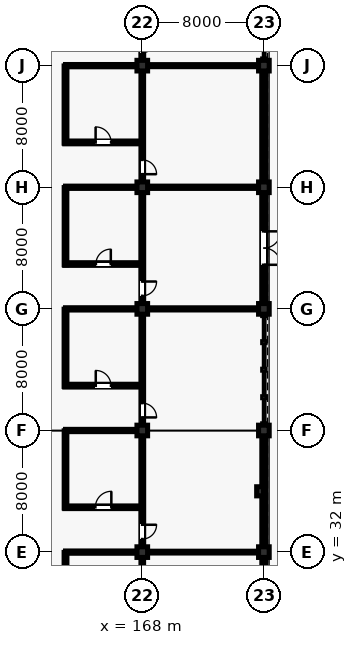
"""IFC4 building model, lengths in metres.
Left out: names, types, materials, properties, quantities, classifications, styles, units other than length and angle.
Written with IfcOpenShell. Run it as: python <this file> out.ifc"""

import sys

from ifc_helpers import new_model, si_unit, direction, frame, frame_2d, origin, origin_2d, place, context, subcontext, project, spatial, rectangle, extrude, element, fill, save


model = new_model("IFC4")
c1 = context("Model", 3, precision=1e-05, world=origin(), true_north=direction((0.0, 1.0)))
c2 = subcontext(c1, "Body", "Model", "MODEL_VIEW")
j1 = project(units=[si_unit("LENGTHUNIT", "METRE"), si_unit("PLANEANGLEUNIT", "RADIAN")], contexts=[c1])
p1 = place(None, origin())
s1 = spatial("IfcSite", under=j1, at=p1, CompositionType="ELEMENT")
p2 = place(p1, origin())
s2 = spatial("IfcBuilding", under=s1, at=p2, CompositionType="ELEMENT")
p3 = place(p2, origin())
s3 = spatial("IfcBuildingStorey", under=s2, at=p3, CompositionType="ELEMENT", Elevation=0.0)
for number, where, z_axis, x_axis in (
    (1, (168.0, 32.0, 0.0), (0.0, 0.0, 1.0), (1.0, 0.0, 0.0)),
    (2, (168.0, 40.0, 0.0), (0.0, 0.0, 1.0), (1.0, 0.0, 0.0)),
    (3, (168.0, 48.0, 0.0), (0.0, 0.0, 1.0), (1.0, 0.0, 0.0)),
    (4, (168.0, 56.0, 0.0), (0.0, 0.0, 1.0), (1.0, 0.0, 0.0)),
    (5, (168.0, 64.0, 0.0), (0.0, 0.0, 1.0), (1.0, 0.0, 0.0)),
    (6, (176.0, 32.0, 0.0), (0.0, 0.0, 1.0), (1.0, 0.0, 0.0)),
    (7, (176.0, 40.0, 0.0), (0.0, 0.0, 1.0), (1.0, 0.0, 0.0)),
    (8, (176.0, 48.0, 0.0), (0.0, 0.0, 1.0), (1.0, 0.0, 0.0)),
    (9, (176.0, 56.0, 0.0), (0.0, 0.0, 1.0), (1.0, 0.0, 0.0)),
    (10, (176.0, 64.0, 0.0), (0.0, 0.0, 1.0), (1.0, 0.0, 0.0)),
):
    element("IfcColumn", number, at=place(p3, frame(where, z_axis=z_axis, x_axis=x_axis)), inside=s3, PredefinedType="COLUMN", context=c2, shape_type="SweptSolid", body=[
        extrude(rectangle(XDim=0.7, YDim=0.7, at=origin_2d()), origin(), (0.0, 0.0, 1.0), 5.28),
    ])
p4 = place(p3, frame((175.75, 36.0, 0.0), z_axis=(0.0, 0.0, 1.0), x_axis=(1.0, 0.0, 0.0)))
e11 = element("IfcColumn", 11, at=p4, inside=s3, PredefinedType="PILASTER", context=c2, shape_type="SweptSolid", body=[
    extrude(rectangle(XDim=0.45, YDim=0.6, at=origin_2d()), origin(), (0.0, 0.0, 1.0), 5.28),
])
p5 = place(p3, frame((176.0, 24.385, 0.0), z_axis=(0.0, 0.0, 1.0), x_axis=(0.0, 1.0, 0.0)))
e12 = element("IfcWall", 12, at=p5, inside=s3, PredefinedType="SOLIDWALL", context=c2, shape_type="SweptSolid", body=[
    extrude(rectangle(XDim=7.28, YDim=0.27, at=frame_2d((3.64, 0.0))), origin(), (0.0, 0.0, 1.0), 4.674),
])
p6 = place(p5, frame((2.54, 0.0, 0.0)))
e13 = element("IfcOpeningElement", 13, at=p6, cuts=e12, PredefinedType="OPENING", context=c2, shape_type="SweptSolid", body=[
    extrude(rectangle(XDim=2.2, YDim=2.5, at=frame_2d((1.1, 1.25))), frame((0.0, 0.145, 0.0), z_axis=(0.0, -1.0, 0.0), x_axis=(1.0, 0.0, 0.0)), (0.0, 0.0, 1.0), 0.29),
])
p7 = place(p3, frame((176.0, 32.335, 0.0), z_axis=(0.0, 0.0, 1.0), x_axis=(0.0, 1.0, 0.0)))
e14 = element("IfcWall", 14, at=p7, inside=s3, PredefinedType="SOLIDWALL", context=c2, shape_type="SweptSolid", body=[
    extrude(rectangle(XDim=7.33, YDim=0.27, at=frame_2d((3.665, 0.0))), origin(), (0.0, 0.0, 1.0), 4.614),
])
p8 = place(p7, frame((4.25, 0.0, 0.9)))
e15 = element("IfcOpeningElement", 15, at=p8, cuts=e14, PredefinedType="OPENING", context=c2, shape_type="SweptSolid", body=[
    extrude(rectangle(XDim=2.15, YDim=2.8, at=frame_2d((1.075, 1.4))), frame((0.0, 0.145, 0.0), z_axis=(0.0, -1.0, 0.0), x_axis=(1.0, 0.0, 0.0)), (0.0, 0.0, 1.0), 0.29),
])
p9 = place(p3, frame((176.0, 48.335, 0.0), z_axis=(0.0, 0.0, 1.0), x_axis=(0.0, 1.0, 0.0)))
e16 = element("IfcWall", 16, at=p9, inside=s3, PredefinedType="SOLIDWALL", context=c2, shape_type="SweptSolid", body=[
    extrude(rectangle(XDim=7.33, YDim=0.28, at=frame_2d((3.665, 0.0))), origin(), (0.0, 0.0, 1.0), 4.61),
])
p10 = place(p9, frame((2.565, 0.0, 0.0)))
e17 = element("IfcOpeningElement", 17, at=p10, cuts=e16, PredefinedType="OPENING", context=c2, shape_type="SweptSolid", body=[
    extrude(rectangle(XDim=2.2, YDim=2.5, at=frame_2d((1.1, 1.25))), frame((0.0, 0.15, 0.0), z_axis=(0.0, -1.0, 0.0), x_axis=(1.0, 0.0, 0.0)), (0.0, 0.0, 1.0), 0.3),
])
p11 = place(p3, frame((176.0, 56.335, 0.0), z_axis=(0.0, 0.0, 1.0), x_axis=(0.0, 1.0, 0.0)))
e18 = element("IfcWall", 18, at=p11, inside=s3, PredefinedType="SOLIDWALL", context=c2, shape_type="SweptSolid", body=[
    extrude(rectangle(XDim=7.33, YDim=0.28, at=frame_2d((3.665, 0.0))), origin(), (0.0, 0.0, 1.0), 4.674),
])
p12 = place(p11, frame((2.465, 0.0, 0.9)))
e19 = element("IfcOpeningElement", 19, at=p12, cuts=e18, PredefinedType="OPENING", context=c2, shape_type="SweptSolid", body=[
    extrude(rectangle(XDim=2.4, YDim=2.8, at=frame_2d((1.2, 1.4))), frame((0.0, 0.15, 0.0), z_axis=(0.0, -1.0, 0.0), x_axis=(1.0, 0.0, 0.0)), (0.0, 0.0, 1.0), 0.3),
])
p13 = place(p3, frame((162.95, 26.9, 0.0), z_axis=(0.0, 0.0, 1.0), x_axis=(0.0, 1.0, 0.0)))
e20 = element("IfcWall", 20, at=p13, inside=s3, PredefinedType="PARTITIONING", context=c2, shape_type="SweptSolid", body=[
    extrude(rectangle(XDim=5.08, YDim=0.185, at=frame_2d((2.54, 0.0))), origin(), (0.0, 0.0, 1.0), 4.327),
])
p14 = place(p3, frame((162.95, 32.0, 0.0), z_axis=(0.0, 0.0, 1.0), x_axis=(1.0, 0.0, 0.0)))
e21 = element("IfcWall", 21, at=p14, inside=s3, PredefinedType="PARTITIONING", context=c2, shape_type="SweptSolid", body=[
    extrude(rectangle(XDim=4.69, YDim=0.15, at=frame_2d((2.345, 0.0))), origin(), (0.0, 0.0, 1.0), 4.327),
])
p15 = place(p3, frame((162.9, 34.95, 0.0), z_axis=(0.0, 0.0, 1.0), x_axis=(1.0, 0.0, 0.0)))
e22 = element("IfcWall", 22, at=p15, inside=s3, PredefinedType="PARTITIONING", context=c2, shape_type="SweptSolid", body=[
    extrude(rectangle(XDim=5.08, YDim=0.175, at=frame_2d((2.54, 0.0))), origin(), (0.0, 0.0, 1.0), 4.412),
])
p16 = place(p15, frame((2.015, 0.0, 0.0)))
e23 = element("IfcOpeningElement", 23, at=p16, cuts=e22, PredefinedType="OPENING", context=c2, shape_type="SweptSolid", body=[
    extrude(rectangle(XDim=1.05, YDim=2.15, at=frame_2d((0.525, 1.075))), frame((0.0, 0.097, 0.0), z_axis=(0.0, -1.0, 0.0), x_axis=(1.0, 0.0, 0.0)), (0.0, 0.0, 1.0), 0.195),
])
p17 = place(p3, frame((162.95, 34.9, 0.0), z_axis=(0.0, 0.0, 1.0), x_axis=(0.0, 1.0, 0.0)))
e24 = element("IfcWall", 24, at=p17, inside=s3, PredefinedType="PARTITIONING", context=c2, shape_type="SweptSolid", body=[
    extrude(rectangle(XDim=5.08, YDim=0.175, at=frame_2d((2.54, 0.0))), origin(), (0.0, 0.0, 1.0), 4.403),
])
p18 = place(p3, frame((162.95, 40.0, 0.0), z_axis=(0.0, 0.0, 1.0), x_axis=(1.0, 0.0, 0.0)))
e25 = element("IfcWall", 25, at=p18, inside=s3, PredefinedType="PARTITIONING", context=c2, shape_type="SweptSolid", body=[
    extrude(rectangle(XDim=4.69, YDim=0.15, at=frame_2d((2.345, 0.0))), origin(), (0.0, 0.0, 1.0), 4.403),
])
p19 = place(p3, frame((162.9, 42.95, 0.0), z_axis=(0.0, 0.0, 1.0), x_axis=(1.0, 0.0, 0.0)))
e26 = element("IfcWall", 26, at=p19, inside=s3, PredefinedType="PARTITIONING", context=c2, shape_type="SweptSolid", body=[
    extrude(rectangle(XDim=5.08, YDim=0.185, at=frame_2d((2.54, 0.0))), origin(), (0.0, 0.0, 1.0), 4.404),
])
p20 = place(p19, frame((2.04, 0.0, 0.0)))
e27 = element("IfcOpeningElement", 27, at=p20, cuts=e26, PredefinedType="OPENING", context=c2, shape_type="SweptSolid", body=[
    extrude(rectangle(XDim=1.0, YDim=2.15, at=frame_2d((0.5, 1.075))), frame((0.0, 0.103, 0.0), z_axis=(0.0, -1.0, 0.0), x_axis=(1.0, 0.0, 0.0)), (0.0, 0.0, 1.0), 0.205),
])
p21 = place(p3, frame((162.95, 42.9, 0.0), z_axis=(0.0, 0.0, 1.0), x_axis=(0.0, 1.0, 0.0)))
e28 = element("IfcWall", 28, at=p21, inside=s3, PredefinedType="PARTITIONING", context=c2, shape_type="SweptSolid", body=[
    extrude(rectangle(XDim=5.08, YDim=0.185, at=frame_2d((2.54, 0.0))), origin(), (0.0, 0.0, 1.0), 4.336),
])
p22 = place(p3, frame((162.95, 48.0, 0.0), z_axis=(0.0, 0.0, 1.0), x_axis=(1.0, 0.0, 0.0)))
e29 = element("IfcWall", 29, at=p22, inside=s3, PredefinedType="PARTITIONING", context=c2, shape_type="SweptSolid", body=[
    extrude(rectangle(XDim=4.69, YDim=0.15, at=frame_2d((2.345, 0.0))), origin(), (0.0, 0.0, 1.0), 4.336),
])
p23 = place(p3, frame((162.9, 50.95, 0.0), z_axis=(0.0, 0.0, 1.0), x_axis=(1.0, 0.0, 0.0)))
e30 = element("IfcWall", 30, at=p23, inside=s3, PredefinedType="PARTITIONING", context=c2, shape_type="SweptSolid", body=[
    extrude(rectangle(XDim=5.08, YDim=0.175, at=frame_2d((2.54, 0.0))), origin(), (0.0, 0.0, 1.0), 4.471),
])
p24 = place(p23, frame((2.05, 0.0, 0.0)))
e31 = element("IfcOpeningElement", 31, at=p24, cuts=e30, PredefinedType="OPENING", context=c2, shape_type="SweptSolid", body=[
    extrude(rectangle(XDim=0.98, YDim=2.15, at=frame_2d((0.49, 1.075))), frame((0.0, 0.097, 0.0), z_axis=(0.0, -1.0, 0.0), x_axis=(1.0, 0.0, 0.0)), (0.0, 0.0, 1.0), 0.195),
])
p25 = place(p3, frame((162.95, 50.9, 0.0), z_axis=(0.0, 0.0, 1.0), x_axis=(0.0, 1.0, 0.0)))
e32 = element("IfcWall", 32, at=p25, inside=s3, PredefinedType="PARTITIONING", context=c2, shape_type="SweptSolid", body=[
    extrude(rectangle(XDim=5.08, YDim=0.175, at=frame_2d((2.54, 0.0))), origin(), (0.0, 0.0, 1.0), 4.404),
])
p26 = place(p3, frame((162.95, 56.0, 0.0), z_axis=(0.0, 0.0, 1.0), x_axis=(1.0, 0.0, 0.0)))
e33 = element("IfcWall", 33, at=p26, inside=s3, PredefinedType="PARTITIONING", context=c2, shape_type="SweptSolid", body=[
    extrude(rectangle(XDim=4.69, YDim=0.15, at=frame_2d((2.345, 0.0))), origin(), (0.0, 0.0, 1.0), 4.404),
])
p27 = place(p3, frame((162.9, 58.95, 0.0), z_axis=(0.0, 0.0, 1.0), x_axis=(1.0, 0.0, 0.0)))
e34 = element("IfcWall", 34, at=p27, inside=s3, PredefinedType="PARTITIONING", context=c2, shape_type="SweptSolid", body=[
    extrude(rectangle(XDim=5.08, YDim=0.185, at=frame_2d((2.54, 0.0))), origin(), (0.0, 0.0, 1.0), 4.403),
])
p28 = place(p27, frame((2.03, 0.0, 0.0)))
e35 = element("IfcOpeningElement", 35, at=p28, cuts=e34, PredefinedType="OPENING", context=c2, shape_type="SweptSolid", body=[
    extrude(rectangle(XDim=1.02, YDim=2.2, at=frame_2d((0.51, 1.1))), frame((0.0, 0.103, 0.0), z_axis=(0.0, -1.0, 0.0), x_axis=(1.0, 0.0, 0.0)), (0.0, 0.0, 1.0), 0.205),
])
p29 = place(p3, frame((162.95, 58.9, 0.0), z_axis=(0.0, 0.0, 1.0), x_axis=(0.0, 1.0, 0.0)))
e36 = element("IfcWall", 36, at=p29, inside=s3, PredefinedType="PARTITIONING", context=c2, shape_type="SweptSolid", body=[
    extrude(rectangle(XDim=5.08, YDim=0.185, at=frame_2d((2.54, 0.0))), origin(), (0.0, 0.0, 1.0), 4.332),
])
p30 = place(p3, frame((162.95, 64.0, 0.0), z_axis=(0.0, 0.0, 1.0), x_axis=(1.0, 0.0, 0.0)))
e37 = element("IfcWall", 37, at=p30, inside=s3, PredefinedType="PARTITIONING", context=c2, shape_type="SweptSolid", body=[
    extrude(rectangle(XDim=4.69, YDim=0.15, at=frame_2d((2.345, 0.0))), origin(), (0.0, 0.0, 1.0), 4.332),
])
p31 = place(p3, frame((168.0, 24.39, 0.0), z_axis=(0.0, 0.0, 1.0), x_axis=(0.0, 1.0, 0.0)))
e38 = element("IfcWall", 38, at=p31, inside=s3, PredefinedType="PARTITIONING", context=c2, shape_type="SweptSolid", body=[
    extrude(rectangle(XDim=7.27, YDim=0.175, at=frame_2d((3.635, 0.0))), origin(), (0.0, 0.0, 1.0), 4.403),
])
p32 = place(p31, frame((0.52, 0.0, 0.0)))
e39 = element("IfcOpeningElement", 39, at=p32, cuts=e38, PredefinedType="OPENING", context=c2, shape_type="SweptSolid", body=[
    extrude(rectangle(XDim=0.94, YDim=2.12, at=frame_2d((0.47, 1.06))), frame((0.0, 0.097, 0.0), z_axis=(0.0, -1.0, 0.0), x_axis=(1.0, 0.0, 0.0)), (0.0, 0.0, 1.0), 0.195),
])
p33 = place(p3, frame((168.0, 32.34, 0.0), z_axis=(0.0, 0.0, 1.0), x_axis=(0.0, 1.0, 0.0)))
e40 = element("IfcWall", 40, at=p33, inside=s3, PredefinedType="PARTITIONING", context=c2, shape_type="SweptSolid", body=[
    extrude(rectangle(XDim=7.32, YDim=0.185, at=frame_2d((3.66, 0.0))), origin(), (0.0, 0.0, 1.0), 4.412),
])
p34 = place(p33, frame((0.52, 0.0, 0.0)))
e41 = element("IfcOpeningElement", 41, at=p34, cuts=e40, PredefinedType="OPENING", context=c2, shape_type="SweptSolid", body=[
    extrude(rectangle(XDim=0.94, YDim=2.12, at=frame_2d((0.47, 1.06))), frame((0.0, 0.103, 0.0), z_axis=(0.0, -1.0, 0.0), x_axis=(1.0, 0.0, 0.0)), (0.0, 0.0, 1.0), 0.205),
])
p35 = place(p3, frame((168.0, 40.34, 0.0), z_axis=(0.0, 0.0, 1.0), x_axis=(0.0, 1.0, 0.0)))
e42 = element("IfcWall", 42, at=p35, inside=s3, PredefinedType="PARTITIONING", context=c2, shape_type="SweptSolid", body=[
    extrude(rectangle(XDim=7.32, YDim=0.175, at=frame_2d((3.66, 0.0))), origin(), (0.0, 0.0, 1.0), 4.404),
])
p36 = place(p35, frame((0.52, 0.0, 0.0)))
e43 = element("IfcOpeningElement", 43, at=p36, cuts=e42, PredefinedType="OPENING", context=c2, shape_type="SweptSolid", body=[
    extrude(rectangle(XDim=0.94, YDim=2.12, at=frame_2d((0.47, 1.06))), frame((0.0, 0.097, 0.0), z_axis=(0.0, -1.0, 0.0), x_axis=(1.0, 0.0, 0.0)), (0.0, 0.0, 1.0), 0.195),
])
p37 = place(p3, frame((168.0, 48.34, 0.0), z_axis=(0.0, 0.0, 1.0), x_axis=(0.0, 1.0, 0.0)))
e44 = element("IfcWall", 44, at=p37, inside=s3, PredefinedType="PARTITIONING", context=c2, shape_type="SweptSolid", body=[
    extrude(rectangle(XDim=7.32, YDim=0.185, at=frame_2d((3.66, 0.0))), origin(), (0.0, 0.0, 1.0), 4.471),
])
p38 = place(p37, frame((0.52, 0.0, 0.0)))
e45 = element("IfcOpeningElement", 45, at=p38, cuts=e44, PredefinedType="OPENING", context=c2, shape_type="SweptSolid", body=[
    extrude(rectangle(XDim=0.94, YDim=2.12, at=frame_2d((0.47, 1.06))), frame((0.0, 0.103, 0.0), z_axis=(0.0, -1.0, 0.0), x_axis=(1.0, 0.0, 0.0)), (0.0, 0.0, 1.0), 0.205),
])
p39 = place(p3, frame((168.0, 56.34, 0.0), z_axis=(0.0, 0.0, 1.0), x_axis=(0.0, 1.0, 0.0)))
e46 = element("IfcWall", 46, at=p39, inside=s3, PredefinedType="PARTITIONING", context=c2, shape_type="SweptSolid", body=[
    extrude(rectangle(XDim=7.32, YDim=0.175, at=frame_2d((3.66, 0.0))), origin(), (0.0, 0.0, 1.0), 4.403),
])
p40 = place(p39, frame((0.52, 0.0, 0.0)))
e47 = element("IfcOpeningElement", 47, at=p40, cuts=e46, PredefinedType="OPENING", context=c2, shape_type="SweptSolid", body=[
    extrude(rectangle(XDim=0.94, YDim=2.12, at=frame_2d((0.47, 1.06))), frame((0.0, 0.097, 0.0), z_axis=(0.0, -1.0, 0.0), x_axis=(1.0, 0.0, 0.0)), (0.0, 0.0, 1.0), 0.195),
])
p41 = place(p3, frame((168.0, 64.34, 0.0), z_axis=(0.0, 0.0, 1.0), x_axis=(0.0, 1.0, 0.0)))
e48 = element("IfcWall", 48, at=p41, inside=s3, PredefinedType="PARTITIONING", context=c2, shape_type="SweptSolid", body=[
    extrude(rectangle(XDim=7.32, YDim=0.185, at=frame_2d((3.66, 0.0))), origin(), (0.0, 0.0, 1.0), 4.412),
])
p42 = place(p41, frame((0.52, 0.0, 0.0)))
e49 = element("IfcOpeningElement", 49, at=p42, cuts=e48, PredefinedType="OPENING", context=c2, shape_type="SweptSolid", body=[
    extrude(rectangle(XDim=0.94, YDim=2.12, at=frame_2d((0.47, 1.06))), frame((0.0, 0.103, 0.0), z_axis=(0.0, -1.0, 0.0), x_axis=(1.0, 0.0, 0.0)), (0.0, 0.0, 1.0), 0.205),
])
p43 = place(p3, frame((168.34, 32.0, 0.0), z_axis=(0.0, 0.0, 1.0), x_axis=(1.0, 0.0, 0.0)))
e50 = element("IfcWall", 50, at=p43, inside=s3, PredefinedType="PARTITIONING", context=c2, shape_type="SweptSolid", body=[
    extrude(rectangle(XDim=7.32, YDim=0.12, at=frame_2d((3.66, 0.0))), origin(), (0.0, 0.0, 1.0), 4.403),
])
p44 = place(p3, frame((168.34, 48.0, 0.0), z_axis=(0.0, 0.0, 1.0), x_axis=(1.0, 0.0, 0.0)))
e51 = element("IfcWall", 51, at=p44, inside=s3, PredefinedType="PARTITIONING", context=c2, shape_type="SweptSolid", body=[
    extrude(rectangle(XDim=7.32, YDim=0.142, at=frame_2d((3.66, 0.0))), origin(), (0.0, 0.0, 1.0), 4.404),
])
p45 = place(p3, frame((168.34, 56.0, 0.0), z_axis=(0.0, 0.0, 1.0), x_axis=(1.0, 0.0, 0.0)))
e52 = element("IfcWall", 52, at=p45, inside=s3, PredefinedType="PARTITIONING", context=c2, shape_type="SweptSolid", body=[
    extrude(rectangle(XDim=7.32, YDim=0.15, at=frame_2d((3.66, 0.0))), origin(), (0.0, 0.0, 1.0), 4.327),
])
p46 = place(p3, frame((168.34, 64.0, 0.0), z_axis=(0.0, 0.0, 1.0), x_axis=(1.0, 0.0, 0.0)))
e53 = element("IfcWall", 53, at=p46, inside=s3, PredefinedType="PARTITIONING", context=c2, shape_type="SweptSolid", body=[
    extrude(rectangle(XDim=7.32, YDim=0.135, at=frame_2d((3.66, 0.0))), origin(), (0.0, 0.0, 1.0), 4.403),
])
p47 = place(p8, origin())
e54 = element("IfcWindow", 54, at=p47, inside=s3, PartitioningType="SINGLE_PANEL", PredefinedType="WINDOW", context=c2, shape_type="SweptSolid", body=[
    extrude(rectangle(XDim=2.15, YDim=2.8, at=frame_2d((1.075, 1.4))), frame((0.0, 0.03, 0.0), z_axis=(0.0, -1.0, 0.0), x_axis=(1.0, 0.0, 0.0)), (0.0, 0.0, 1.0), 0.06),
])
fill(e15, e54)
p48 = place(p10, frame((2.2, 0.0, 0.0), z_axis=(0.0, 0.0, 1.0), x_axis=(-1.0, 0.0, 0.0)))
e55 = element("IfcDoor", 55, at=p48, inside=s3, OperationType="DOUBLE_DOOR_SINGLE_SWING", PredefinedType="DOOR", context=c2, shape_type="SweptSolid", body=[
    extrude(rectangle(XDim=2.2, YDim=2.5, at=frame_2d((1.1, 1.25))), frame((0.0, 0.025, 0.0), z_axis=(0.0, -1.0, 0.0), x_axis=(1.0, 0.0, 0.0)), (0.0, 0.0, 1.0), 0.05),
])
fill(e17, e55)
p49 = place(p12, origin())
e56 = element("IfcWindow", 56, at=p49, inside=s3, PartitioningType="SINGLE_PANEL", PredefinedType="WINDOW", context=c2, shape_type="SweptSolid", body=[
    extrude(rectangle(XDim=2.4, YDim=2.8, at=frame_2d((1.2, 1.4))), frame((0.0, 0.03, 0.0), z_axis=(0.0, -1.0, 0.0), x_axis=(1.0, 0.0, 0.0)), (0.0, 0.0, 1.0), 0.06),
])
fill(e19, e56)
p50 = place(p16, origin())
e57 = element("IfcDoor", 57, at=p50, inside=s3, OperationType="SINGLE_SWING_RIGHT", PredefinedType="DOOR", context=c2, shape_type="SweptSolid", body=[
    extrude(rectangle(XDim=1.05, YDim=2.15, at=frame_2d((0.525, 1.075))), frame((0.0, 0.025, 0.0), z_axis=(0.0, -1.0, 0.0), x_axis=(1.0, 0.0, 0.0)), (0.0, 0.0, 1.0), 0.05),
])
fill(e23, e57)
p51 = place(p20, origin())
e58 = element("IfcDoor", 58, at=p51, inside=s3, OperationType="SINGLE_SWING_LEFT", PredefinedType="DOOR", context=c2, shape_type="SweptSolid", body=[
    extrude(rectangle(XDim=1.0, YDim=2.15, at=frame_2d((0.5, 1.075))), frame((0.0, 0.025, 0.0), z_axis=(0.0, -1.0, 0.0), x_axis=(1.0, 0.0, 0.0)), (0.0, 0.0, 1.0), 0.05),
])
fill(e27, e58)
p52 = place(p24, origin())
e59 = element("IfcDoor", 59, at=p52, inside=s3, OperationType="SINGLE_SWING_RIGHT", PredefinedType="DOOR", context=c2, shape_type="SweptSolid", body=[
    extrude(rectangle(XDim=0.98, YDim=2.15, at=frame_2d((0.49, 1.075))), frame((0.0, 0.025, 0.0), z_axis=(0.0, -1.0, 0.0), x_axis=(1.0, 0.0, 0.0)), (0.0, 0.0, 1.0), 0.05),
])
fill(e31, e59)
p53 = place(p28, origin())
e60 = element("IfcDoor", 60, at=p53, inside=s3, OperationType="SINGLE_SWING_LEFT", PredefinedType="DOOR", context=c2, shape_type="SweptSolid", body=[
    extrude(rectangle(XDim=1.02, YDim=2.2, at=frame_2d((0.51, 1.1))), frame((0.0, 0.025, 0.0), z_axis=(0.0, -1.0, 0.0), x_axis=(1.0, 0.0, 0.0)), (0.0, 0.0, 1.0), 0.05),
])
fill(e35, e60)
p54 = place(p34, frame((0.94, 0.0, 0.0), z_axis=(0.0, 0.0, 1.0), x_axis=(-1.0, 0.0, 0.0)))
e61 = element("IfcDoor", 61, at=p54, inside=s3, OperationType="SINGLE_SWING_RIGHT", PredefinedType="DOOR", context=c2, shape_type="SweptSolid", body=[
    extrude(rectangle(XDim=0.94, YDim=2.12, at=frame_2d((0.47, 1.06))), frame((0.0, 0.025, 0.0), z_axis=(0.0, -1.0, 0.0), x_axis=(1.0, 0.0, 0.0)), (0.0, 0.0, 1.0), 0.05),
])
fill(e41, e61)
p55 = place(p36, frame((0.94, 0.0, 0.0), z_axis=(0.0, 0.0, 1.0), x_axis=(-1.0, 0.0, 0.0)))
e62 = element("IfcDoor", 62, at=p55, inside=s3, OperationType="SINGLE_SWING_LEFT", PredefinedType="DOOR", context=c2, shape_type="SweptSolid", body=[
    extrude(rectangle(XDim=0.94, YDim=2.12, at=frame_2d((0.47, 1.06))), frame((0.0, 0.025, 0.0), z_axis=(0.0, -1.0, 0.0), x_axis=(1.0, 0.0, 0.0)), (0.0, 0.0, 1.0), 0.05),
])
fill(e43, e62)
p56 = place(p38, frame((0.94, 0.0, 0.0), z_axis=(0.0, 0.0, 1.0), x_axis=(-1.0, 0.0, 0.0)))
e63 = element("IfcDoor", 63, at=p56, inside=s3, OperationType="SINGLE_SWING_RIGHT", PredefinedType="DOOR", context=c2, shape_type="SweptSolid", body=[
    extrude(rectangle(XDim=0.94, YDim=2.12, at=frame_2d((0.47, 1.06))), frame((0.0, 0.025, 0.0), z_axis=(0.0, -1.0, 0.0), x_axis=(1.0, 0.0, 0.0)), (0.0, 0.0, 1.0), 0.05),
])
fill(e45, e63)
p57 = place(p40, frame((0.94, 0.0, 0.0), z_axis=(0.0, 0.0, 1.0), x_axis=(-1.0, 0.0, 0.0)))
e64 = element("IfcDoor", 64, at=p57, inside=s3, OperationType="SINGLE_SWING_LEFT", PredefinedType="DOOR", context=c2, shape_type="SweptSolid", body=[
    extrude(rectangle(XDim=0.94, YDim=2.12, at=frame_2d((0.47, 1.06))), frame((0.0, 0.025, 0.0), z_axis=(0.0, -1.0, 0.0), x_axis=(1.0, 0.0, 0.0)), (0.0, 0.0, 1.0), 0.05),
])
fill(e47, e64)
p58 = place(p42, frame((0.94, 0.0, 0.0), z_axis=(0.0, 0.0, 1.0), x_axis=(-1.0, 0.0, 0.0)))
e65 = element("IfcDoor", 65, at=p58, inside=s3, OperationType="SINGLE_SWING_RIGHT", PredefinedType="DOOR", context=c2, shape_type="SweptSolid", body=[
    extrude(rectangle(XDim=0.94, YDim=2.12, at=frame_2d((0.47, 1.06))), frame((0.0, 0.025, 0.0), z_axis=(0.0, -1.0, 0.0), x_axis=(1.0, 0.0, 0.0)), (0.0, 0.0, 1.0), 0.05),
])
fill(e49, e65)
save(model, sys.argv[1])
